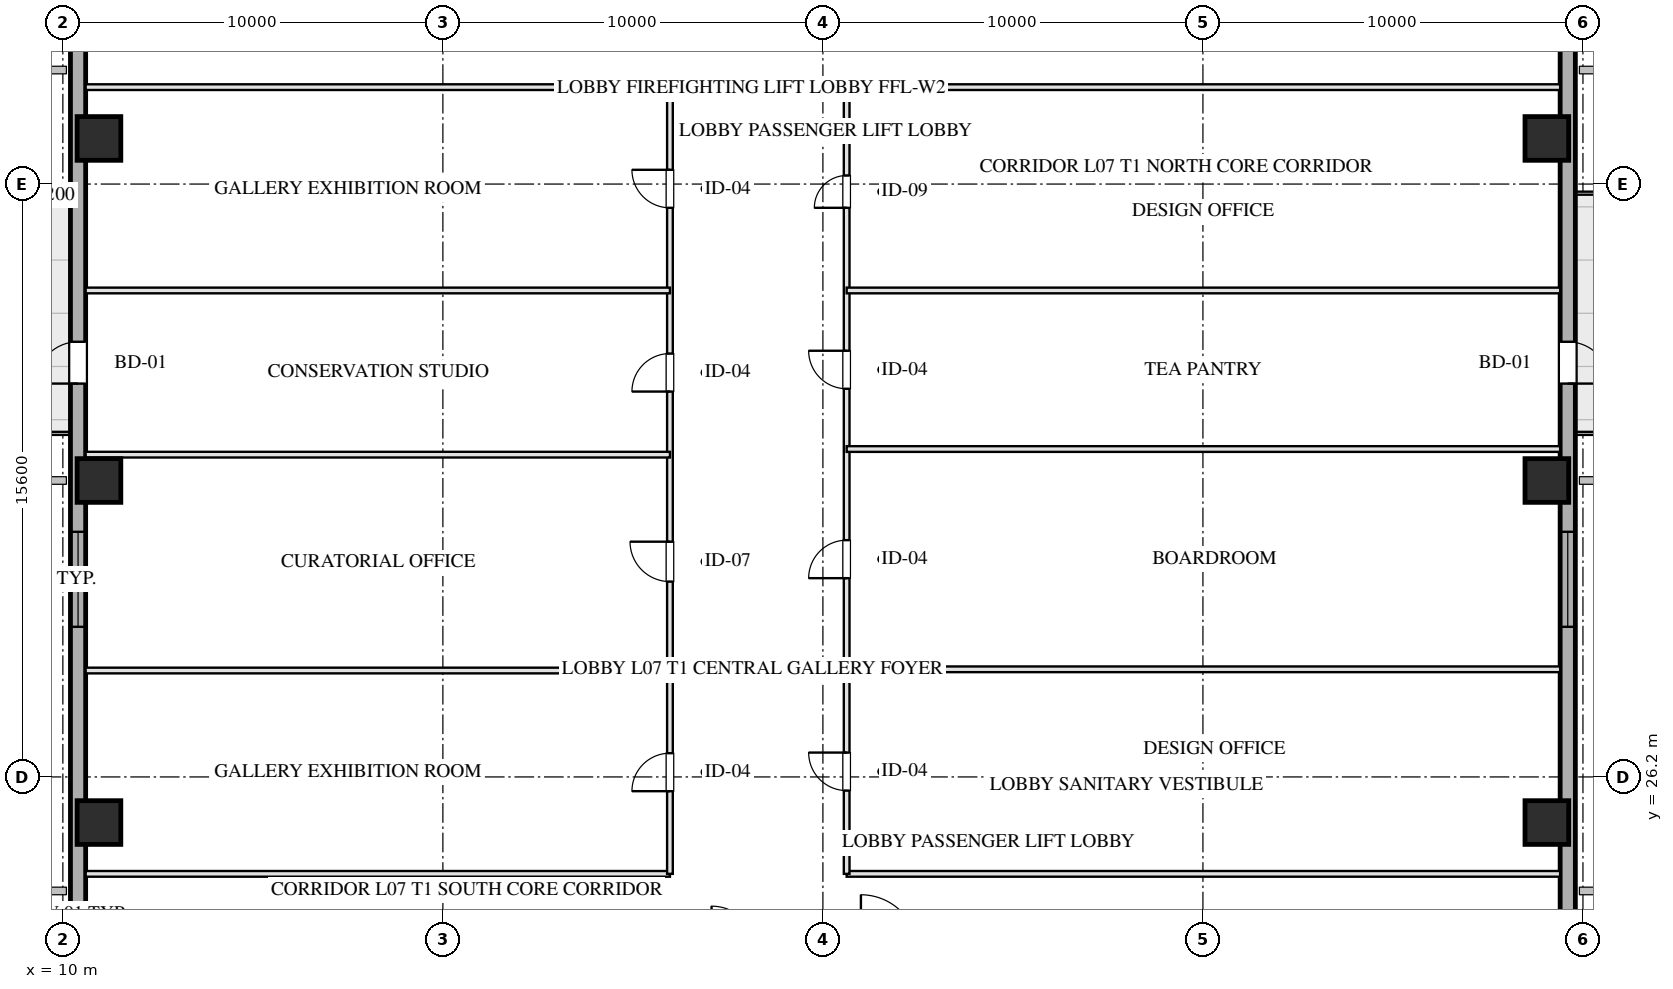
"""IFC4 building model, lengths in metres.
Left out: names, types, materials, properties, quantities, classifications, styles, units other than length and angle.
Written with IfcOpenShell. Run it as: python <this file> out.ifc"""

import sys

from ifc_helpers import new_model, si_unit, direction, frame, frame_2d, origin, origin_2d, place, context, subcontext, project, spatial, rectangle, hollow_rectangle, extrude, element, fill, save


model = new_model("IFC4")
c1 = context("Model", 3, precision=1e-05, world=origin(), true_north=direction((0.0, 1.0)))
c2 = subcontext(c1, "Body", "Model", "MODEL_VIEW")
j1 = project(units=[si_unit("LENGTHUNIT", "METRE"), si_unit("PLANEANGLEUNIT", "RADIAN")], contexts=[c1])
p1 = place(None, origin())
s1 = spatial("IfcSite", under=j1, at=p1, CompositionType="ELEMENT")
p2 = place(p1, origin())
s2 = spatial("IfcBuilding", under=s1, at=p2, CompositionType="ELEMENT")
p3 = place(p2, frame((0.0, 0.0, 34.0)))
s3 = spatial("IfcBuildingStorey", under=s2, at=p3, CompositionType="ELEMENT", Elevation=34.0)
for number, where, z_axis, x_axis in (
    (1, (10.95, 25.0, 0.0), (0.0, 0.0, 1.0), (1.0, 0.0, 0.0)),
    (2, (10.95, 34.0, 0.0), (0.0, 0.0, 1.0), (1.0, 0.0, 0.0)),
    (3, (10.95, 43.0, 0.0), (0.0, 0.0, 1.0), (1.0, 0.0, 0.0)),
    (4, (49.05, 25.0, 0.0), (0.0, 0.0, 1.0), (1.0, 0.0, 0.0)),
    (5, (49.05, 34.0, 0.0), (0.0, 0.0, 1.0), (1.0, 0.0, 0.0)),
    (6, (49.05, 43.0, 0.0), (0.0, 0.0, 1.0), (1.0, 0.0, 0.0)),
):
    element("IfcColumn", number, at=place(p3, frame(where, z_axis=z_axis, x_axis=x_axis)), inside=s3, PredefinedType="COLUMN", context=c2, shape_type="SweptSolid", body=[
        extrude(hollow_rectangle(XDim=1.15, YDim=1.15, WallThickness=0.04, at=origin_2d()), origin(), (0.0, 0.0, 1.0), 4.001),
    ])
p4 = place(p3, frame((10.4, 7.2, 0.0), z_axis=(0.0, 0.0, 1.0), x_axis=(0.0, 1.0, 0.0)))
e7 = element("IfcWall", 7, at=p4, inside=s3, PredefinedType="SOLIDWALL", context=c2, shape_type="SweptSolid", body=[
    extrude(rectangle(XDim=53.6, YDim=0.4, at=frame_2d((26.8, 0.0))), origin(), (0.0, 0.0, 1.0), 3.16),
])
p5 = place(p4, frame((22.95, 0.0, 0.75)))
e8 = element("IfcOpeningElement", 8, at=p5, cuts=e7, PredefinedType="OPENING", context=c2, shape_type="SweptSolid", body=[
    extrude(rectangle(XDim=2.5, YDim=1.75, at=frame_2d((1.25, 0.875))), frame((0.0, 0.21, 0.0), z_axis=(0.0, -1.0, 0.0), x_axis=(1.0, 0.0, 0.0)), (0.0, 0.0, 1.0), 0.42),
])
p6 = place(p4, frame((29.35, 0.0, 0.0)))
e9 = element("IfcOpeningElement", 9, at=p6, cuts=e7, PredefinedType="OPENING", context=c2, shape_type="SweptSolid", body=[
    extrude(rectangle(XDim=1.1, YDim=2.15, at=frame_2d((0.55, 1.075))), frame((0.0, 0.21, 0.0), z_axis=(0.0, -1.0, 0.0), x_axis=(1.0, 0.0, 0.0)), (0.0, 0.0, 1.0), 0.42),
])
p7 = place(p3, frame((49.6, 60.8, 0.0), z_axis=(0.0, 0.0, 1.0), x_axis=(0.0, -1.0, 0.0)))
e10 = element("IfcWall", 10, at=p7, inside=s3, PredefinedType="SOLIDWALL", context=c2, shape_type="SweptSolid", body=[
    extrude(rectangle(XDim=53.6, YDim=0.4, at=frame_2d((26.8, 0.0))), origin(), (0.0, 0.0, 1.0), 3.16),
])
p8 = place(p7, frame((28.15, 0.0, 0.75)))
e11 = element("IfcOpeningElement", 11, at=p8, cuts=e10, PredefinedType="OPENING", context=c2, shape_type="SweptSolid", body=[
    extrude(rectangle(XDim=2.5, YDim=1.75, at=frame_2d((1.25, 0.875))), frame((0.0, 0.21, 0.0), z_axis=(0.0, -1.0, 0.0), x_axis=(1.0, 0.0, 0.0)), (0.0, 0.0, 1.0), 0.42),
])
p9 = place(p7, frame((23.15, 0.0, 0.0)))
e12 = element("IfcOpeningElement", 12, at=p9, cuts=e10, PredefinedType="OPENING", context=c2, shape_type="SweptSolid", body=[
    extrude(rectangle(XDim=1.1, YDim=2.15, at=frame_2d((0.55, 1.075))), frame((0.0, 0.21, 0.0), z_axis=(0.0, -1.0, 0.0), x_axis=(1.0, 0.0, 0.0)), (0.0, 0.0, 1.0), 0.42),
])
p10 = place(p3, frame((10.6, 23.65, 0.0), z_axis=(0.0, 0.0, 1.0), x_axis=(1.0, 0.0, 0.0)))
e13 = element("IfcWall", 13, at=p10, inside=s3, PredefinedType="PARTITIONING", context=c2, shape_type="SweptSolid", body=[
    extrude(rectangle(XDim=15.375, YDim=0.15, at=frame_2d((7.688, 0.0))), origin(), (0.0, 0.0, 1.0), 3.725),
])
p11 = place(p3, frame((30.625, 23.65, 0.0), z_axis=(0.0, 0.0, 1.0), x_axis=(1.0, 0.0, 0.0)))
e14 = element("IfcWall", 14, at=p11, inside=s3, PredefinedType="PARTITIONING", context=c2, shape_type="SweptSolid", body=[
    extrude(rectangle(XDim=18.775, YDim=0.15, at=frame_2d((9.387, 0.0))), origin(), (0.0, 0.0, 1.0), 3.725),
])
p12 = place(p3, frame((10.6, 44.35, 0.0), z_axis=(0.0, 0.0, 1.0), x_axis=(1.0, 0.0, 0.0)))
e15 = element("IfcWall", 15, at=p12, inside=s3, PredefinedType="PARTITIONING", context=c2, shape_type="SweptSolid", body=[
    extrude(rectangle(XDim=15.375, YDim=0.15, at=frame_2d((7.688, 0.0))), origin(), (0.0, 0.0, 1.0), 3.725),
])
p13 = place(p3, frame((30.625, 44.35, 0.0), z_axis=(0.0, 0.0, 1.0), x_axis=(1.0, 0.0, 0.0)))
e16 = element("IfcWall", 16, at=p13, inside=s3, PredefinedType="PARTITIONING", context=c2, shape_type="SweptSolid", body=[
    extrude(rectangle(XDim=18.775, YDim=0.15, at=frame_2d((9.387, 0.0))), origin(), (0.0, 0.0, 1.0), 3.725),
])
p14 = place(p3, frame((25.975, 23.65, 0.0), z_axis=(0.0, 0.0, 1.0), x_axis=(0.0, 1.0, 0.0)))
e17 = element("IfcWall", 17, at=p14, inside=s3, PredefinedType="PARTITIONING", context=c2, shape_type="SweptSolid", body=[
    extrude(rectangle(XDim=20.7, YDim=0.15, at=frame_2d((10.35, 0.0))), origin(), (0.0, 0.0, 1.0), 3.725),
])
p15 = place(p14, frame((2.175, 0.0, 0.0)))
e18 = element("IfcOpeningElement", 18, at=p15, cuts=e17, PredefinedType="OPENING", context=c2, shape_type="SweptSolid", body=[
    extrude(rectangle(XDim=1.0, YDim=2.05, at=frame_2d((0.5, 1.025))), frame((0.0, 0.085, 0.0), z_axis=(0.0, -1.0, 0.0), x_axis=(1.0, 0.0, 0.0)), (0.0, 0.0, 1.0), 0.17),
])
p16 = place(p14, frame((7.69, 0.0, 0.0)))
e19 = element("IfcOpeningElement", 19, at=p16, cuts=e17, PredefinedType="OPENING", context=c2, shape_type="SweptSolid", body=[
    extrude(rectangle(XDim=1.05, YDim=2.05, at=frame_2d((0.525, 1.025))), frame((0.0, 0.085, 0.0), z_axis=(0.0, -1.0, 0.0), x_axis=(1.0, 0.0, 0.0)), (0.0, 0.0, 1.0), 0.17),
])
p17 = place(p14, frame((12.69, 0.0, 0.0)))
e20 = element("IfcOpeningElement", 20, at=p17, cuts=e17, PredefinedType="OPENING", context=c2, shape_type="SweptSolid", body=[
    extrude(rectangle(XDim=1.0, YDim=2.05, at=frame_2d((0.5, 1.025))), frame((0.0, 0.085, 0.0), z_axis=(0.0, -1.0, 0.0), x_axis=(1.0, 0.0, 0.0)), (0.0, 0.0, 1.0), 0.17),
])
p18 = place(p14, frame((17.525, 0.0, 0.0)))
e21 = element("IfcOpeningElement", 21, at=p18, cuts=e17, PredefinedType="OPENING", context=c2, shape_type="SweptSolid", body=[
    extrude(rectangle(XDim=1.0, YDim=2.05, at=frame_2d((0.5, 1.025))), frame((0.0, 0.085, 0.0), z_axis=(0.0, -1.0, 0.0), x_axis=(1.0, 0.0, 0.0)), (0.0, 0.0, 1.0), 0.17),
])
p19 = place(p3, frame((30.625, 23.65, 0.0), z_axis=(0.0, 0.0, 1.0), x_axis=(0.0, 1.0, 0.0)))
e22 = element("IfcWall", 22, at=p19, inside=s3, PredefinedType="PARTITIONING", context=c2, shape_type="SweptSolid", body=[
    extrude(rectangle(XDim=20.7, YDim=0.15, at=frame_2d((10.35, 0.0))), origin(), (0.0, 0.0, 1.0), 3.725),
])
p20 = place(p19, frame((2.191, 0.0, 0.0)))
e23 = element("IfcOpeningElement", 23, at=p20, cuts=e22, PredefinedType="OPENING", context=c2, shape_type="SweptSolid", body=[
    extrude(rectangle(XDim=1.0, YDim=2.05, at=frame_2d((0.5, 1.025))), frame((0.0, 0.085, 0.0), z_axis=(0.0, -1.0, 0.0), x_axis=(1.0, 0.0, 0.0)), (0.0, 0.0, 1.0), 0.17),
])
p21 = place(p19, frame((7.78, 0.0, 0.0)))
e24 = element("IfcOpeningElement", 24, at=p21, cuts=e22, PredefinedType="OPENING", context=c2, shape_type="SweptSolid", body=[
    extrude(rectangle(XDim=1.0, YDim=2.05, at=frame_2d((0.5, 1.025))), frame((0.0, 0.085, 0.0), z_axis=(0.0, -1.0, 0.0), x_axis=(1.0, 0.0, 0.0)), (0.0, 0.0, 1.0), 0.17),
])
p22 = place(p19, frame((12.764, 0.0, 0.0)))
e25 = element("IfcOpeningElement", 25, at=p22, cuts=e22, PredefinedType="OPENING", context=c2, shape_type="SweptSolid", body=[
    extrude(rectangle(XDim=1.0, YDim=2.05, at=frame_2d((0.5, 1.025))), frame((0.0, 0.085, 0.0), z_axis=(0.0, -1.0, 0.0), x_axis=(1.0, 0.0, 0.0)), (0.0, 0.0, 1.0), 0.17),
])
p23 = place(p19, frame((17.525, 0.0, 0.0)))
e26 = element("IfcOpeningElement", 26, at=p23, cuts=e22, PredefinedType="OPENING", context=c2, shape_type="SweptSolid", body=[
    extrude(rectangle(XDim=0.85, YDim=2.05, at=frame_2d((0.425, 1.025))), frame((0.0, 0.085, 0.0), z_axis=(0.0, -1.0, 0.0), x_axis=(1.0, 0.0, 0.0)), (0.0, 0.0, 1.0), 0.17),
])
for number, where, z_axis, x_axis in (
    (27, (10.6, 29.0, 0.0), (0.0, 0.0, 1.0), (1.0, 0.0, 0.0)),
    (28, (10.6, 34.68, 0.0), (0.0, 0.0, 1.0), (1.0, 0.0, 0.0)),
    (29, (10.6, 39.0, 0.0), (0.0, 0.0, 1.0), (1.0, 0.0, 0.0)),
):
    element("IfcWall", number, at=place(p3, frame(where, z_axis=z_axis, x_axis=x_axis)), inside=s3, PredefinedType="PARTITIONING", context=c2, shape_type="SweptSolid", body=[
        extrude(rectangle(XDim=15.375, YDim=0.15, at=frame_2d((7.688, 0.0))), origin(), (0.0, 0.0, 1.0), 3.725),
    ])
for number, where, z_axis, x_axis in (
    (30, (30.625, 29.032, 0.0), (0.0, 0.0, 1.0), (1.0, 0.0, 0.0)),
    (31, (30.625, 34.828, 0.0), (0.0, 0.0, 1.0), (1.0, 0.0, 0.0)),
    (32, (30.625, 39.0, 0.0), (0.0, 0.0, 1.0), (1.0, 0.0, 0.0)),
):
    element("IfcWall", number, at=place(p3, frame(where, z_axis=z_axis, x_axis=x_axis)), inside=s3, PredefinedType="PARTITIONING", context=c2, shape_type="SweptSolid", body=[
        extrude(rectangle(XDim=18.775, YDim=0.15, at=frame_2d((9.387, 0.0))), origin(), (0.0, 0.0, 1.0), 3.725),
    ])
p24 = place(p5, origin())
e33 = element("IfcWindow", 33, at=p24, inside=s3, PartitioningType="TRIPLE_PANEL_VERTICAL", PredefinedType="WINDOW", context=c2, shape_type="SweptSolid", body=[
    extrude(rectangle(XDim=2.5, YDim=1.75, at=frame_2d((1.25, 0.875))), frame((0.0, 0.03, 0.0), z_axis=(0.0, -1.0, 0.0), x_axis=(1.0, 0.0, 0.0)), (0.0, 0.0, 1.0), 0.06),
])
fill(e8, e33)
p25 = place(p8, origin())
e34 = element("IfcWindow", 34, at=p25, inside=s3, PartitioningType="TRIPLE_PANEL_VERTICAL", PredefinedType="WINDOW", context=c2, shape_type="SweptSolid", body=[
    extrude(rectangle(XDim=2.5, YDim=1.75, at=frame_2d((1.25, 0.875))), frame((0.0, 0.03, 0.0), z_axis=(0.0, -1.0, 0.0), x_axis=(1.0, 0.0, 0.0)), (0.0, 0.0, 1.0), 0.06),
])
fill(e11, e34)
p26 = place(p6, origin())
e35 = element("IfcDoor", 35, at=p26, inside=s3, OperationType="SINGLE_SWING_LEFT", PredefinedType="DOOR", context=c2, shape_type="SweptSolid", body=[
    extrude(rectangle(XDim=1.1, YDim=2.15, at=frame_2d((0.55, 1.075))), frame((0.0, 0.025, 0.0), z_axis=(0.0, -1.0, 0.0), x_axis=(1.0, 0.0, 0.0)), (0.0, 0.0, 1.0), 0.05),
])
fill(e9, e35)
p27 = place(p9, origin())
e36 = element("IfcDoor", 36, at=p27, inside=s3, OperationType="SINGLE_SWING_RIGHT", PredefinedType="DOOR", context=c2, shape_type="SweptSolid", body=[
    extrude(rectangle(XDim=1.1, YDim=2.15, at=frame_2d((0.55, 1.075))), frame((0.0, 0.025, 0.0), z_axis=(0.0, -1.0, 0.0), x_axis=(1.0, 0.0, 0.0)), (0.0, 0.0, 1.0), 0.05),
])
fill(e12, e36)
p28 = place(p15, origin())
e37 = element("IfcDoor", 37, at=p28, inside=s3, OperationType="SINGLE_SWING_LEFT", PredefinedType="DOOR", context=c2, shape_type="SweptSolid", body=[
    extrude(rectangle(XDim=1.0, YDim=2.05, at=frame_2d((0.5, 1.025))), frame((0.0, 0.025, 0.0), z_axis=(0.0, -1.0, 0.0), x_axis=(1.0, 0.0, 0.0)), (0.0, 0.0, 1.0), 0.05),
])
fill(e18, e37)
p29 = place(p16, origin())
e38 = element("IfcDoor", 38, at=p29, inside=s3, OperationType="SINGLE_SWING_RIGHT", PredefinedType="DOOR", context=c2, shape_type="SweptSolid", body=[
    extrude(rectangle(XDim=1.05, YDim=2.05, at=frame_2d((0.525, 1.025))), frame((0.0, 0.025, 0.0), z_axis=(0.0, -1.0, 0.0), x_axis=(1.0, 0.0, 0.0)), (0.0, 0.0, 1.0), 0.05),
])
fill(e19, e38)
p30 = place(p17, origin())
e39 = element("IfcDoor", 39, at=p30, inside=s3, OperationType="SINGLE_SWING_LEFT", PredefinedType="DOOR", context=c2, shape_type="SweptSolid", body=[
    extrude(rectangle(XDim=1.0, YDim=2.05, at=frame_2d((0.5, 1.025))), frame((0.0, 0.025, 0.0), z_axis=(0.0, -1.0, 0.0), x_axis=(1.0, 0.0, 0.0)), (0.0, 0.0, 1.0), 0.05),
])
fill(e20, e39)
p31 = place(p18, origin())
e40 = element("IfcDoor", 40, at=p31, inside=s3, OperationType="SINGLE_SWING_RIGHT", PredefinedType="DOOR", context=c2, shape_type="SweptSolid", body=[
    extrude(rectangle(XDim=1.0, YDim=2.05, at=frame_2d((0.5, 1.025))), frame((0.0, 0.025, 0.0), z_axis=(0.0, -1.0, 0.0), x_axis=(1.0, 0.0, 0.0)), (0.0, 0.0, 1.0), 0.05),
])
fill(e21, e40)
p32 = place(p20, origin())
e41 = element("IfcDoor", 41, at=p32, inside=s3, OperationType="SINGLE_SWING_RIGHT", PredefinedType="DOOR", context=c2, shape_type="SweptSolid", body=[
    extrude(rectangle(XDim=1.0, YDim=2.05, at=frame_2d((0.5, 1.025))), frame((0.0, 0.025, 0.0), z_axis=(0.0, -1.0, 0.0), x_axis=(1.0, 0.0, 0.0)), (0.0, 0.0, 1.0), 0.05),
])
fill(e23, e41)
p33 = place(p21, origin())
e42 = element("IfcDoor", 42, at=p33, inside=s3, OperationType="SINGLE_SWING_LEFT", PredefinedType="DOOR", context=c2, shape_type="SweptSolid", body=[
    extrude(rectangle(XDim=1.0, YDim=2.05, at=frame_2d((0.5, 1.025))), frame((0.0, 0.025, 0.0), z_axis=(0.0, -1.0, 0.0), x_axis=(1.0, 0.0, 0.0)), (0.0, 0.0, 1.0), 0.05),
])
fill(e24, e42)
p34 = place(p22, origin())
e43 = element("IfcDoor", 43, at=p34, inside=s3, OperationType="SINGLE_SWING_RIGHT", PredefinedType="DOOR", context=c2, shape_type="SweptSolid", body=[
    extrude(rectangle(XDim=1.0, YDim=2.05, at=frame_2d((0.5, 1.025))), frame((0.0, 0.025, 0.0), z_axis=(0.0, -1.0, 0.0), x_axis=(1.0, 0.0, 0.0)), (0.0, 0.0, 1.0), 0.05),
])
fill(e25, e43)
p35 = place(p23, origin())
e44 = element("IfcDoor", 44, at=p35, inside=s3, OperationType="SINGLE_SWING_LEFT", PredefinedType="DOOR", context=c2, shape_type="SweptSolid", body=[
    extrude(rectangle(XDim=0.85, YDim=2.05, at=frame_2d((0.425, 1.025))), frame((0.0, 0.025, 0.0), z_axis=(0.0, -1.0, 0.0), x_axis=(1.0, 0.0, 0.0)), (0.0, 0.0, 1.0), 0.05),
])
fill(e26, e44)
save(model, sys.argv[1])
